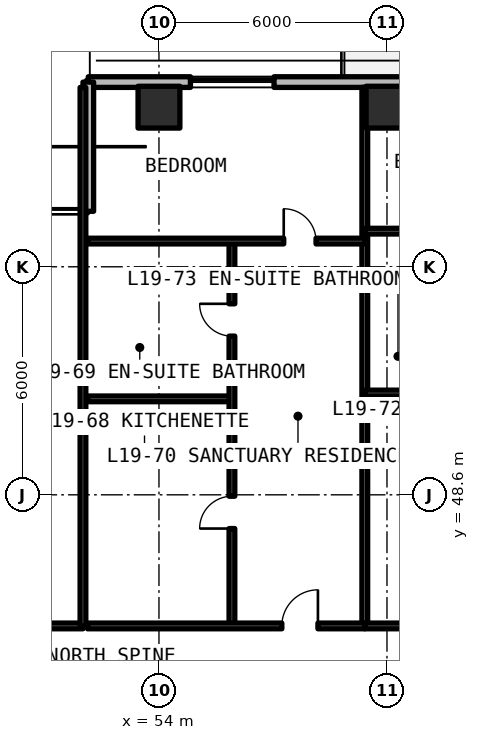
"""IFC4 building model, lengths in metres.
Left out: names, types, materials, properties, quantities, classifications, styles, units other than length and angle.
Written with IfcOpenShell. Run it as: python <this file> out.ifc"""

import sys

from ifc_helpers import new_model, si_unit, direction, frame, frame_2d, origin, origin_2d, place, context, subcontext, project, spatial, rectangle, extrude, element, fill, save


model = new_model("IFC4")
c1 = context("Model", 3, precision=1e-05, world=origin(), true_north=direction((0.0, 1.0)))
c2 = subcontext(c1, "Body", "Model", "MODEL_VIEW")
j1 = project(units=[si_unit("LENGTHUNIT", "METRE"), si_unit("PLANEANGLEUNIT", "RADIAN")], contexts=[c1])
p1 = place(None, origin())
s1 = spatial("IfcSite", under=j1, at=p1, CompositionType="ELEMENT")
p2 = place(p1, origin())
s2 = spatial("IfcBuilding", under=s1, at=p2, CompositionType="ELEMENT")
p3 = place(p2, frame((0.0, 0.0, 69.63)))
s3 = spatial("IfcBuildingStorey", under=s2, at=p3, CompositionType="ELEMENT", Elevation=69.63)
for number, where, z_axis, x_axis in (
    (1, (54.0, 58.8, 0.0), (0.0, 0.0, 1.0), (1.0, 0.0, 0.0)),
    (2, (60.0, 58.8, 0.0), (0.0, 0.0, 1.0), (1.0, 0.0, 0.0)),
):
    element("IfcColumn", number, at=place(p3, frame(where, z_axis=z_axis, x_axis=x_axis)), inside=s3, PredefinedType="COLUMN", context=c2, shape_type="SweptSolid", body=[
        extrude(rectangle(XDim=1.1, YDim=1.1, at=origin_2d()), origin(), (0.0, 0.0, 1.0), 3.63),
    ])
p4 = place(p3, frame((96.542, 59.46, 0.0), z_axis=(0.0, 0.0, 1.0), x_axis=(-1.0, 0.0, 0.0)))
e3 = element("IfcWall", 3, at=p4, inside=s3, PredefinedType="SOLIDWALL", context=c2, shape_type="SweptSolid", body=[
    extrude(rectangle(XDim=44.402, YDim=0.28, at=frame_2d((22.201, 0.0))), origin(), (0.0, 0.0, 1.0), 3.35),
])
p5 = place(p4, frame((32.592, 0.0, 0.0)))
e4 = element("IfcOpeningElement", 4, at=p5, cuts=e3, PredefinedType="OPENING", context=c2, shape_type="SweptSolid", body=[
    extrude(rectangle(XDim=1.1, YDim=2.15, at=frame_2d((0.55, 1.075))), frame((0.0, 0.15, 0.0), z_axis=(0.0, -1.0, 0.0), x_axis=(1.0, 0.0, 0.0)), (0.0, 0.0, 1.0), 0.3),
])
p6 = place(p4, frame((20.242, 0.0, 0.0)))
e5 = element("IfcOpeningElement", 5, at=p6, cuts=e3, PredefinedType="OPENING", context=c2, shape_type="SweptSolid", body=[
    extrude(rectangle(XDim=1.1, YDim=2.15, at=frame_2d((0.55, 1.075))), frame((0.0, 0.15, 0.0), z_axis=(0.0, -1.0, 0.0), x_axis=(1.0, 0.0, 0.0)), (0.0, 0.0, 1.0), 0.3),
])
p7 = place(p4, frame((9.392, 0.0, 0.0)))
e6 = element("IfcOpeningElement", 6, at=p7, cuts=e3, PredefinedType="OPENING", context=c2, shape_type="SweptSolid", body=[
    extrude(rectangle(XDim=1.1, YDim=2.15, at=frame_2d((0.55, 1.075))), frame((0.0, 0.15, 0.0), z_axis=(0.0, -1.0, 0.0), x_axis=(1.0, 0.0, 0.0)), (0.0, 0.0, 1.0), 0.3),
])
p8 = place(p4, frame((39.514, 0.0, 0.78)))
e7 = element("IfcOpeningElement", 7, at=p8, cuts=e3, PredefinedType="OPENING", context=c2, shape_type="SweptSolid", body=[
    extrude(rectangle(XDim=2.2, YDim=1.66, at=frame_2d((1.1, 0.83))), frame((0.0, 0.15, 0.0), z_axis=(0.0, -1.0, 0.0), x_axis=(1.0, 0.0, 0.0)), (0.0, 0.0, 1.0), 0.3),
])
p9 = place(p4, frame((25.379, 0.0, 0.78)))
e8 = element("IfcOpeningElement", 8, at=p9, cuts=e3, PredefinedType="OPENING", context=c2, shape_type="SweptSolid", body=[
    extrude(rectangle(XDim=2.2, YDim=1.66, at=frame_2d((1.1, 0.83))), frame((0.0, 0.15, 0.0), z_axis=(0.0, -1.0, 0.0), x_axis=(1.0, 0.0, 0.0)), (0.0, 0.0, 1.0), 0.3),
])
p10 = place(p4, frame((2.564, 0.0, 0.78)))
e9 = element("IfcOpeningElement", 9, at=p10, cuts=e3, PredefinedType="OPENING", context=c2, shape_type="SweptSolid", body=[
    extrude(rectangle(XDim=2.2, YDim=1.66, at=frame_2d((1.1, 0.83))), frame((0.0, 0.15, 0.0), z_axis=(0.0, -1.0, 0.0), x_axis=(1.0, 0.0, 0.0)), (0.0, 0.0, 1.0), 0.3),
])
p11 = place(p3, frame((52.14, 59.46, 0.0), z_axis=(0.0, 0.0, 1.0), x_axis=(0.0, -1.0, 0.0)))
e10 = element("IfcWall", 10, at=p11, inside=s3, PredefinedType="SOLIDWALL", context=c2, shape_type="SweptSolid", body=[
    extrude(rectangle(XDim=3.4, YDim=0.28, at=frame_2d((1.7, 0.0))), origin(), (0.0, 0.0, 1.0), 3.35),
])
p12 = place(p3, frame((43.6, 45.15, 0.0), z_axis=(0.0, 0.0, 1.0), x_axis=(1.0, 0.0, 0.0)))
e11 = element("IfcWall", 11, at=p12, inside=s3, PredefinedType="SOLIDWALL", context=c2, shape_type="SweptSolid", body=[
    extrude(rectangle(XDim=8.4, YDim=0.15, at=frame_2d((4.2, 0.0))), origin(), (0.0, 0.0, 1.0), 2.57),
])
p13 = place(p12, frame((3.65, 0.0, 0.0)))
e12 = element("IfcOpeningElement", 12, at=p13, cuts=e11, PredefinedType="OPENING", context=c2, shape_type="SweptSolid", body=[
    extrude(rectangle(XDim=1.1, YDim=2.15, at=frame_2d((0.55, 1.075))), frame((0.0, 0.085, 0.0), z_axis=(0.0, -1.0, 0.0), x_axis=(1.0, 0.0, 0.0)), (0.0, 0.0, 1.0), 0.17),
])
for number, where, z_axis, x_axis in (
    (13, (52.0, 45.15, 0.0), (0.0, 0.0, 1.0), (0.0, 1.0, 0.0)),
    (14, (59.416, 45.15, 0.0), (0.0, 0.0, 1.0), (0.0, 1.0, 0.0)),
):
    element("IfcWall", number, at=place(p3, frame(where, z_axis=z_axis, x_axis=x_axis)), inside=s3, PredefinedType="SOLIDWALL", context=c2, shape_type="SweptSolid", body=[
        extrude(rectangle(XDim=14.17, YDim=0.15, at=frame_2d((7.085, 0.0))), origin(), (0.0, 0.0, 1.0), 2.57),
    ])
p14 = place(p3, frame((52.12, 51.125, 0.0), z_axis=(0.0, 0.0, 1.0), x_axis=(1.0, 0.0, 0.0)))
e15 = element("IfcWall", 15, at=p14, inside=s3, PredefinedType="PARTITIONING", context=c2, shape_type="SweptSolid", body=[
    extrude(rectangle(XDim=3.8, YDim=0.15, at=frame_2d((1.9, 0.0))), origin(), (0.0, 0.0, 1.0), 2.57),
])
p15 = place(p3, frame((55.92, 45.15, 0.0), z_axis=(0.0, 0.0, 1.0), x_axis=(0.0, 1.0, 0.0)))
e16 = element("IfcWall", 16, at=p15, inside=s3, PredefinedType="PARTITIONING", context=c2, shape_type="SweptSolid", body=[
    extrude(rectangle(XDim=10.127, YDim=0.15, at=frame_2d((5.063, 0.0))), origin(), (0.0, 0.0, 1.0), 2.57),
])
p16 = place(p15, frame((2.562, 0.0, 0.0)))
e17 = element("IfcOpeningElement", 17, at=p16, cuts=e16, PredefinedType="OPENING", context=c2, shape_type="SweptSolid", body=[
    extrude(rectangle(XDim=0.85, YDim=2.1, at=frame_2d((0.425, 1.05))), frame((0.0, 0.085, 0.0), z_axis=(0.0, -1.0, 0.0), x_axis=(1.0, 0.0, 0.0)), (0.0, 0.0, 1.0), 0.17),
])
p17 = place(p15, frame((7.626, 0.0, 0.0)))
e18 = element("IfcOpeningElement", 18, at=p17, cuts=e16, PredefinedType="OPENING", context=c2, shape_type="SweptSolid", body=[
    extrude(rectangle(XDim=0.85, YDim=2.1, at=frame_2d((0.425, 1.05))), frame((0.0, 0.085, 0.0), z_axis=(0.0, -1.0, 0.0), x_axis=(1.0, 0.0, 0.0)), (0.0, 0.0, 1.0), 0.17),
])
p18 = place(p3, frame((52.12, 55.277, 0.0), z_axis=(0.0, 0.0, 1.0), x_axis=(1.0, 0.0, 0.0)))
e19 = element("IfcWall", 19, at=p18, inside=s3, PredefinedType="PARTITIONING", context=c2, shape_type="SweptSolid", body=[
    extrude(rectangle(XDim=7.296, YDim=0.15, at=frame_2d((3.648, 0.0))), origin(), (0.0, 0.0, 1.0), 2.57),
])
p19 = place(p18, frame((5.163, 0.0, 0.0)))
e20 = element("IfcOpeningElement", 20, at=p19, cuts=e19, PredefinedType="OPENING", context=c2, shape_type="SweptSolid", body=[
    extrude(rectangle(XDim=0.85, YDim=2.1, at=frame_2d((0.425, 1.05))), frame((0.0, 0.085, 0.0), z_axis=(0.0, -1.0, 0.0), x_axis=(1.0, 0.0, 0.0)), (0.0, 0.0, 1.0), 0.17),
])
p20 = place(p3, frame((52.12, 45.15, 0.0), z_axis=(0.0, 0.0, 1.0), x_axis=(1.0, 0.0, 0.0)))
e21 = element("IfcWall", 21, at=p20, inside=s3, PredefinedType="SOLIDWALL", context=c2, shape_type="SweptSolid", body=[
    extrude(rectangle(XDim=7.296, YDim=0.15, at=frame_2d((3.648, 0.0))), origin(), (0.0, 0.0, 1.0), 2.57),
])
p21 = place(p20, frame((5.113, 0.0, 0.0)))
e22 = element("IfcOpeningElement", 22, at=p21, cuts=e21, PredefinedType="OPENING", context=c2, shape_type="SweptSolid", body=[
    extrude(rectangle(XDim=0.95, YDim=2.15, at=frame_2d((0.475, 1.075))), frame((0.0, 0.085, 0.0), z_axis=(0.0, -1.0, 0.0), x_axis=(1.0, 0.0, 0.0)), (0.0, 0.0, 1.0), 0.17),
])
p22 = place(p3, frame((59.416, 51.279, 0.0), z_axis=(0.0, 0.0, 1.0), x_axis=(1.0, 0.0, 0.0)))
e23 = element("IfcWall", 23, at=p22, inside=s3, PredefinedType="PARTITIONING", context=c2, shape_type="SweptSolid", body=[
    extrude(rectangle(XDim=2.504, YDim=0.15, at=frame_2d((1.252, 0.0))), origin(), (0.0, 0.0, 1.0), 2.57),
])
p23 = place(p3, frame((59.416, 55.538, 0.0), z_axis=(0.0, 0.0, 1.0), x_axis=(1.0, 0.0, 0.0)))
e24 = element("IfcWall", 24, at=p23, inside=s3, PredefinedType="PARTITIONING", context=c2, shape_type="SweptSolid", body=[
    extrude(rectangle(XDim=7.799, YDim=0.15, at=frame_2d((3.9, 0.0))), origin(), (0.0, 0.0, 1.0), 2.57),
])
p24 = place(p23, frame((4.767, 0.0, 0.0)))
e25 = element("IfcOpeningElement", 25, at=p24, cuts=e24, PredefinedType="OPENING", context=c2, shape_type="SweptSolid", body=[
    extrude(rectangle(XDim=0.85, YDim=2.1, at=frame_2d((0.425, 1.05))), frame((0.0, 0.085, 0.0), z_axis=(0.0, -1.0, 0.0), x_axis=(1.0, 0.0, 0.0)), (0.0, 0.0, 1.0), 0.17),
])
p25 = place(p3, frame((59.416, 45.15, 0.0), z_axis=(0.0, 0.0, 1.0), x_axis=(1.0, 0.0, 0.0)))
e26 = element("IfcWall", 26, at=p25, inside=s3, PredefinedType="SOLIDWALL", context=c2, shape_type="SweptSolid", body=[
    extrude(rectangle(XDim=7.799, YDim=0.15, at=frame_2d((3.9, 0.0))), origin(), (0.0, 0.0, 1.0), 2.57),
])
p26 = place(p25, frame((4.717, 0.0, 0.0)))
e27 = element("IfcOpeningElement", 27, at=p26, cuts=e26, PredefinedType="OPENING", context=c2, shape_type="SweptSolid", body=[
    extrude(rectangle(XDim=0.95, YDim=2.15, at=frame_2d((0.475, 1.075))), frame((0.0, 0.085, 0.0), z_axis=(0.0, -1.0, 0.0), x_axis=(1.0, 0.0, 0.0)), (0.0, 0.0, 1.0), 0.17),
])
p27 = place(p8, origin())
e28 = element("IfcWindow", 28, at=p27, inside=s3, PartitioningType="SINGLE_PANEL", PredefinedType="WINDOW", context=c2, shape_type="SweptSolid", body=[
    extrude(rectangle(XDim=2.2, YDim=1.66, at=frame_2d((1.1, 0.83))), frame((0.0, 0.03, 0.0), z_axis=(0.0, -1.0, 0.0), x_axis=(1.0, 0.0, 0.0)), (0.0, 0.0, 1.0), 0.06),
])
fill(e7, e28)
p28 = place(p16, origin())
e29 = element("IfcDoor", 29, at=p28, inside=s3, OperationType="SINGLE_SWING_LEFT", PredefinedType="DOOR", context=c2, shape_type="SweptSolid", body=[
    extrude(rectangle(XDim=0.85, YDim=2.1, at=frame_2d((0.425, 1.05))), frame((0.0, 0.025, 0.0), z_axis=(0.0, -1.0, 0.0), x_axis=(1.0, 0.0, 0.0)), (0.0, 0.0, 1.0), 0.05),
])
fill(e17, e29)
p29 = place(p17, origin())
e30 = element("IfcDoor", 30, at=p29, inside=s3, OperationType="SINGLE_SWING_RIGHT", PredefinedType="DOOR", context=c2, shape_type="SweptSolid", body=[
    extrude(rectangle(XDim=0.85, YDim=2.1, at=frame_2d((0.425, 1.05))), frame((0.0, 0.025, 0.0), z_axis=(0.0, -1.0, 0.0), x_axis=(1.0, 0.0, 0.0)), (0.0, 0.0, 1.0), 0.05),
])
fill(e18, e30)
p30 = place(p19, origin())
e31 = element("IfcDoor", 31, at=p30, inside=s3, OperationType="SINGLE_SWING_LEFT", PredefinedType="DOOR", context=c2, shape_type="SweptSolid", body=[
    extrude(rectangle(XDim=0.85, YDim=2.1, at=frame_2d((0.425, 1.05))), frame((0.0, 0.025, 0.0), z_axis=(0.0, -1.0, 0.0), x_axis=(1.0, 0.0, 0.0)), (0.0, 0.0, 1.0), 0.05),
])
fill(e20, e31)
p31 = place(p21, origin())
e32 = element("IfcDoor", 32, at=p31, inside=s3, OperationType="SINGLE_SWING_RIGHT", PredefinedType="DOOR", context=c2, shape_type="SweptSolid", body=[
    extrude(rectangle(XDim=0.95, YDim=2.15, at=frame_2d((0.475, 1.075))), frame((0.0, 0.025, 0.0), z_axis=(0.0, -1.0, 0.0), x_axis=(1.0, 0.0, 0.0)), (0.0, 0.0, 1.0), 0.05),
])
fill(e22, e32)
save(model, sys.argv[1])
